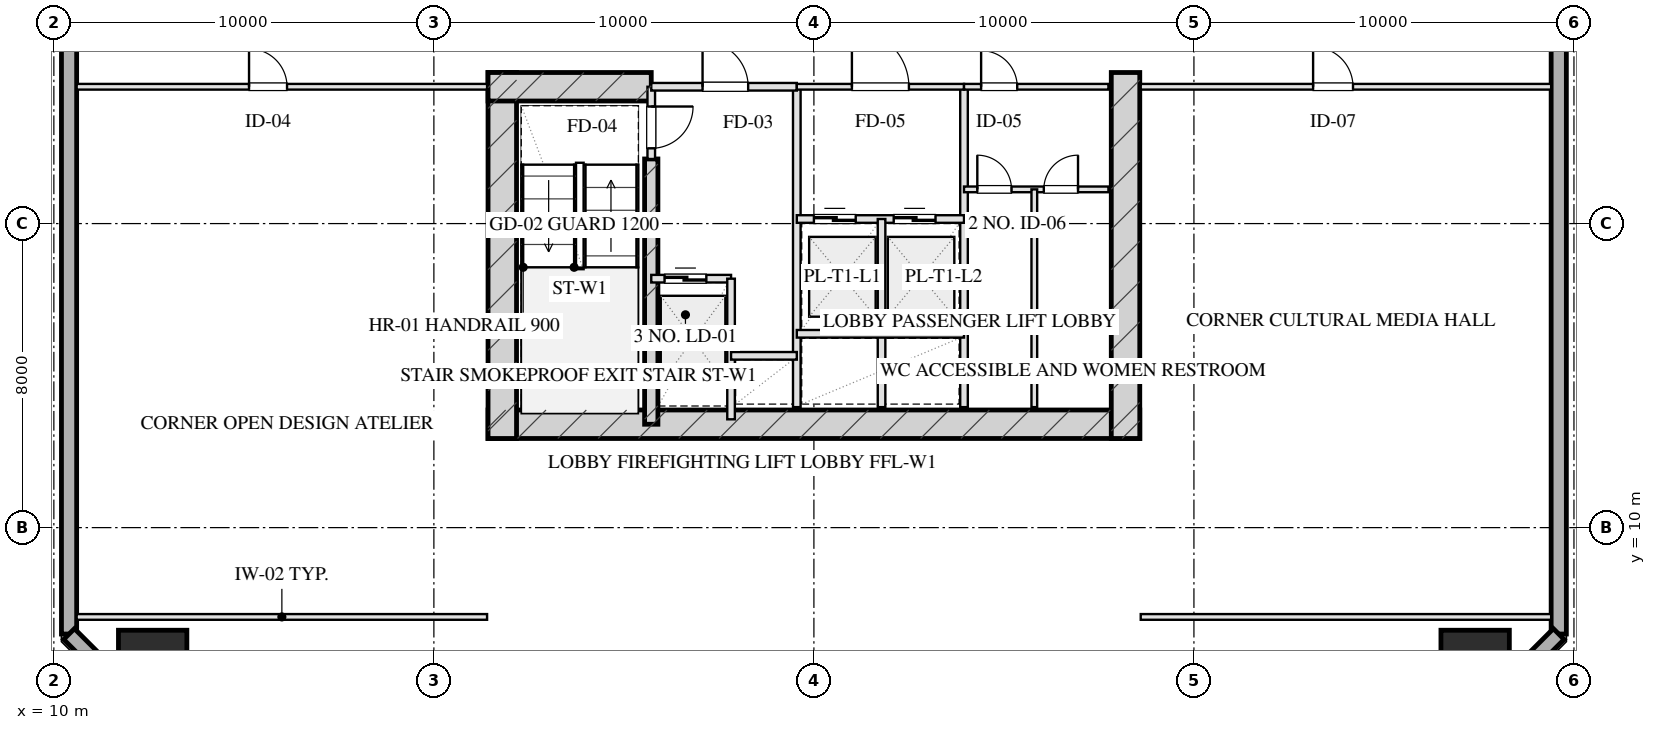
"""IFC4 building model, lengths in metres.
Left out: names, types, materials, properties, quantities, classifications, styles, units other than length and angle.
Written with IfcOpenShell. Run it as: python <this file> out.ifc"""

import sys

from ifc_helpers import new_model, si_unit, direction, frame, frame_2d, origin, origin_2d, place, context, subcontext, project, spatial, rectangle, hollow_rectangle, extrude, element, fill, save


model = new_model("IFC4")
c1 = context("Model", 3, precision=1e-05, world=origin(), true_north=direction((0.0, 1.0)))
c2 = subcontext(c1, "Body", "Model", "MODEL_VIEW")
j1 = project(units=[si_unit("LENGTHUNIT", "METRE"), si_unit("PLANEANGLEUNIT", "RADIAN")], contexts=[c1])
p1 = place(None, origin())
s1 = spatial("IfcSite", under=j1, at=p1, CompositionType="ELEMENT")
p2 = place(p1, origin())
s2 = spatial("IfcBuilding", under=s1, at=p2, CompositionType="ELEMENT")
p3 = place(p2, frame((0.0, 0.0, 81.65)))
s3 = spatial("IfcBuildingStorey", under=s2, at=p3, CompositionType="ELEMENT", Elevation=81.65)
p4 = place(p3, frame((21.425, 12.72, 0.0), z_axis=(0.0, 0.0, 1.0), x_axis=(1.0, 0.0, 0.0)))
e1 = element("IfcWall", 1, at=p4, inside=s3, PredefinedType="SHEAR", context=c2, shape_type="SweptSolid", body=[
    extrude(rectangle(XDim=17.15, YDim=0.75, at=frame_2d((8.575, 0.0))), origin(), (0.0, 0.0, 1.0), 3.45),
])
for number, where, z_axis, x_axis in (
    (2, (21.8, 21.975, 0.0), (0.0, 0.0, 1.0), (0.0, -1.0, 0.0)),
    (3, (38.2, 21.975, 0.0), (0.0, 0.0, 1.0), (0.0, -1.0, 0.0)),
):
    element("IfcWall", number, at=place(p3, frame(where, z_axis=z_axis, x_axis=x_axis)), inside=s3, PredefinedType="SHEAR", context=c2, shape_type="SweptSolid", body=[
        extrude(rectangle(XDim=9.63, YDim=0.75, at=frame_2d((4.815, 0.0))), origin(), (0.0, 0.0, 1.0), 3.45),
    ])
p5 = place(p3, frame((25.72, 19.7, 0.0), z_axis=(0.0, 0.0, 1.0), x_axis=(0.0, -1.0, 0.0)))
e4 = element("IfcWall", 4, at=p5, inside=s3, PredefinedType="SHEAR", context=c2, shape_type="SweptSolid", body=[
    extrude(rectangle(XDim=6.98, YDim=0.35, at=frame_2d((3.49, 0.0))), origin(), (0.0, 0.0, 1.0), 3.45),
])
p6 = place(p3, frame((21.425, 21.6, 0.0), z_axis=(0.0, 0.0, 1.0), x_axis=(1.0, 0.0, 0.0)))
e5 = element("IfcWall", 5, at=p6, inside=s3, PredefinedType="SHEAR", context=c2, shape_type="SweptSolid", body=[
    extrude(rectangle(XDim=4.295, YDim=0.75, at=frame_2d((2.147, 0.0))), origin(), (0.0, 0.0, 1.0), 3.45),
])
for number, where, z_axis, x_axis in (
    (6, (12.6, 6.4, 0.0), (0.0, 0.0, 1.0), (1.0, 0.0, 0.0)),
    (7, (47.4, 6.4, 0.0), (0.0, 0.0, 1.0), (1.0, 0.0, 0.0)),
):
    element("IfcColumn", number, at=place(p3, frame(where, z_axis=z_axis, x_axis=x_axis)), inside=s3, PredefinedType="COLUMN", context=c2, shape_type="SweptSolid", body=[
        extrude(hollow_rectangle(XDim=1.8, YDim=1.8, WallThickness=0.06, at=origin_2d()), origin(), (0.0, 0.0, 1.0), 3.451),
    ])
p7 = place(p3, frame((10.4, 7.2, 0.0), z_axis=(0.0, 0.0, 1.0), x_axis=(0.0, 1.0, 0.0)))
e8 = element("IfcWall", 8, at=p7, inside=s3, PredefinedType="SOLIDWALL", context=c2, shape_type="SweptSolid", body=[
    extrude(rectangle(XDim=53.6, YDim=0.4, at=frame_2d((26.8, 0.0))), origin(), (0.0, 0.0, 1.0), 2.61),
])
p8 = place(p7, frame((28.2, 0.0, 0.75)))
e9 = element("IfcOpeningElement", 9, at=p8, cuts=e8, PredefinedType="OPENING", context=c2, shape_type="SweptSolid", body=[
    extrude(rectangle(XDim=2.4, YDim=1.46, at=frame_2d((1.2, 0.73))), frame((0.0, 0.21, 0.0), z_axis=(0.0, -1.0, 0.0), x_axis=(1.0, 0.0, 0.0)), (0.0, 0.0, 1.0), 0.42),
])
p9 = place(p7, frame((32.0, 0.0, 0.75)))
e10 = element("IfcOpeningElement", 10, at=p9, cuts=e8, PredefinedType="OPENING", context=c2, shape_type="SweptSolid", body=[
    extrude(rectangle(XDim=2.4, YDim=1.46, at=frame_2d((1.2, 0.73))), frame((0.0, 0.21, 0.0), z_axis=(0.0, -1.0, 0.0), x_axis=(1.0, 0.0, 0.0)), (0.0, 0.0, 1.0), 0.42),
])
p10 = place(p7, frame((21.85, 0.0, 0.0)))
e11 = element("IfcOpeningElement", 11, at=p10, cuts=e8, PredefinedType="OPENING", context=c2, shape_type="SweptSolid", body=[
    extrude(rectangle(XDim=1.1, YDim=2.15, at=frame_2d((0.55, 1.075))), frame((0.0, 0.21, 0.0), z_axis=(0.0, -1.0, 0.0), x_axis=(1.0, 0.0, 0.0)), (0.0, 0.0, 1.0), 0.42),
])
p11 = place(p3, frame((49.6, 60.8, 0.0), z_axis=(0.0, 0.0, 1.0), x_axis=(0.0, -1.0, 0.0)))
e12 = element("IfcWall", 12, at=p11, inside=s3, PredefinedType="SOLIDWALL", context=c2, shape_type="SweptSolid", body=[
    extrude(rectangle(XDim=53.6, YDim=0.4, at=frame_2d((26.8, 0.0))), origin(), (0.0, 0.0, 1.0), 2.61),
])
p12 = place(p11, frame((32.05, 0.0, 0.0)))
e13 = element("IfcOpeningElement", 13, at=p12, cuts=e12, PredefinedType="OPENING", context=c2, shape_type="SweptSolid", body=[
    extrude(rectangle(XDim=1.1, YDim=2.15, at=frame_2d((0.55, 1.075))), frame((0.0, 0.21, 0.0), z_axis=(0.0, -1.0, 0.0), x_axis=(1.0, 0.0, 0.0)), (0.0, 0.0, 1.0), 0.42),
])
for number, where, z_axis, x_axis in (
    (14, (49.6, 7.2, 0.0), (0.0, 0.0, 1.0), (-0.707, -0.707, 0.0)),
    (15, (13.4, 4.2, 0.0), (0.0, 0.0, 1.0), (-0.707, 0.707, 0.0)),
):
    element("IfcWall", number, at=place(p3, frame(where, z_axis=z_axis, x_axis=x_axis)), inside=s3, PredefinedType="SOLIDWALL", context=c2, shape_type="SweptSolid", body=[
        extrude(rectangle(XDim=4.243, YDim=0.4, at=frame_2d((2.121, 0.0))), origin(), (0.0, 0.0, 1.0), 2.61),
    ])
p13 = place(p3, frame((25.72, 21.6, 0.0), z_axis=(0.0, 0.0, 1.0), x_axis=(0.0, -1.0, 0.0)))
e16 = element("IfcWall", 16, at=p13, inside=s3, PredefinedType="PARTITIONING", context=c2, shape_type="SweptSolid", body=[
    extrude(rectangle(XDim=1.9, YDim=0.2, at=frame_2d((0.95, 0.0))), origin(), (0.0, 0.0, 1.0), 3.175),
])
p14 = place(p13, frame((0.52, 0.0, 0.0)))
e17 = element("IfcOpeningElement", 17, at=p14, cuts=e16, PredefinedType="OPENING", context=c2, shape_type="SweptSolid", body=[
    extrude(rectangle(XDim=1.1, YDim=2.05, at=frame_2d((0.55, 1.025))), frame((0.0, 0.11, 0.0), z_axis=(0.0, -1.0, 0.0), x_axis=(1.0, 0.0, 0.0)), (0.0, 0.0, 1.0), 0.22),
])
p15 = place(p3, frame((29.55, 21.6, 0.0), z_axis=(0.0, 0.0, 1.0), x_axis=(0.0, -1.0, 0.0)))
e18 = element("IfcWall", 18, at=p15, inside=s3, PredefinedType="PARTITIONING", context=c2, shape_type="SweptSolid", body=[
    extrude(rectangle(XDim=8.43, YDim=0.2, at=frame_2d((4.215, 0.0))), origin(), (0.0, 0.0, 1.0), 3.175),
])
p16 = place(p3, frame((25.72, 21.6, 0.0), z_axis=(0.0, 0.0, 1.0), x_axis=(1.0, 0.0, 0.0)))
e19 = element("IfcWall", 19, at=p16, inside=s3, PredefinedType="PARTITIONING", context=c2, shape_type="SweptSolid", body=[
    extrude(rectangle(XDim=3.83, YDim=0.2, at=frame_2d((1.915, 0.0))), origin(), (0.0, 0.0, 1.0), 3.175),
])
p17 = place(p16, frame((1.35, 0.0, 0.0)))
e20 = element("IfcOpeningElement", 20, at=p17, cuts=e19, PredefinedType="OPENING", context=c2, shape_type="SweptSolid", body=[
    extrude(rectangle(XDim=1.2, YDim=2.05, at=frame_2d((0.6, 1.025))), frame((0.0, 0.11, 0.0), z_axis=(0.0, -1.0, 0.0), x_axis=(1.0, 0.0, 0.0)), (0.0, 0.0, 1.0), 0.22),
])
p18 = place(p3, frame((25.72, 16.55, 0.0), z_axis=(0.0, 0.0, 1.0), x_axis=(1.0, 0.0, 0.0)))
e21 = element("IfcWall", 21, at=p18, inside=s3, PredefinedType="PARTITIONING", context=c2, shape_type="SweptSolid", body=[
    extrude(rectangle(XDim=2.1, YDim=0.2, at=frame_2d((1.05, 0.0))), origin(), (0.0, 0.0, 1.0), 3.175),
])
p19 = place(p18, frame((0.35, 0.0, 0.0)))
e22 = element("IfcOpeningElement", 22, at=p19, cuts=e21, PredefinedType="OPENING", context=c2, shape_type="SweptSolid", body=[
    extrude(rectangle(XDim=1.1, YDim=2.05, at=frame_2d((0.55, 1.025))), frame((0.0, 0.11, 0.0), z_axis=(0.0, -1.0, 0.0), x_axis=(1.0, 0.0, 0.0)), (0.0, 0.0, 1.0), 0.22),
])
p20 = place(p3, frame((27.82, 16.55, 0.0), z_axis=(0.0, 0.0, 1.0), x_axis=(0.0, -1.0, 0.0)))
e23 = element("IfcWall", 23, at=p20, inside=s3, PredefinedType="PARTITIONING", context=c2, shape_type="SweptSolid", body=[
    extrude(rectangle(XDim=3.7, YDim=0.2, at=frame_2d((1.85, 0.0))), origin(), (0.0, 0.0, 1.0), 3.175),
])
p21 = place(p3, frame((27.82, 14.52, 0.0), z_axis=(0.0, 0.0, 1.0), x_axis=(1.0, 0.0, 0.0)))
e24 = element("IfcWall", 24, at=p21, inside=s3, PredefinedType="PARTITIONING", context=c2, shape_type="SweptSolid", body=[
    extrude(rectangle(XDim=1.73, YDim=0.2, at=frame_2d((0.865, 0.0))), origin(), (0.0, 0.0, 1.0), 3.175),
])
p22 = place(p3, frame((33.95, 21.6, 0.0), z_axis=(0.0, 0.0, 1.0), x_axis=(0.0, -1.0, 0.0)))
e25 = element("IfcWall", 25, at=p22, inside=s3, PredefinedType="PARTITIONING", context=c2, shape_type="SweptSolid", body=[
    extrude(rectangle(XDim=8.43, YDim=0.2, at=frame_2d((4.215, 0.0))), origin(), (0.0, 0.0, 1.0), 3.175),
])
p23 = place(p3, frame((29.55, 21.6, 0.0), z_axis=(0.0, 0.0, 1.0), x_axis=(1.0, 0.0, 0.0)))
e26 = element("IfcWall", 26, at=p23, inside=s3, PredefinedType="PARTITIONING", context=c2, shape_type="SweptSolid", body=[
    extrude(rectangle(XDim=4.4, YDim=0.15, at=frame_2d((2.2, 0.0))), origin(), (0.0, 0.0, 1.0), 3.175),
])
p24 = place(p23, frame((1.45, 0.0, 0.0)))
e27 = element("IfcOpeningElement", 27, at=p24, cuts=e26, PredefinedType="OPENING", context=c2, shape_type="SweptSolid", body=[
    extrude(rectangle(XDim=1.5, YDim=2.05, at=frame_2d((0.75, 1.025))), frame((0.0, 0.085, 0.0), z_axis=(0.0, -1.0, 0.0), x_axis=(1.0, 0.0, 0.0)), (0.0, 0.0, 1.0), 0.17),
])
p25 = place(p3, frame((29.55, 18.12, 0.0), z_axis=(0.0, 0.0, 1.0), x_axis=(1.0, 0.0, 0.0)))
e28 = element("IfcWall", 28, at=p25, inside=s3, PredefinedType="PARTITIONING", context=c2, shape_type="SweptSolid", body=[
    extrude(rectangle(XDim=4.4, YDim=0.2, at=frame_2d((2.2, 0.0))), origin(), (0.0, 0.0, 1.0), 3.175),
])
p26 = place(p25, frame((0.45, 0.0, 0.0)))
e29 = element("IfcOpeningElement", 29, at=p26, cuts=e28, PredefinedType="OPENING", context=c2, shape_type="SweptSolid", body=[
    extrude(rectangle(XDim=1.1, YDim=2.05, at=frame_2d((0.55, 1.025))), frame((0.0, 0.11, 0.0), z_axis=(0.0, -1.0, 0.0), x_axis=(1.0, 0.0, 0.0)), (0.0, 0.0, 1.0), 0.22),
])
p27 = place(p25, frame((2.55, 0.0, 0.0)))
e30 = element("IfcOpeningElement", 30, at=p27, cuts=e28, PredefinedType="OPENING", context=c2, shape_type="SweptSolid", body=[
    extrude(rectangle(XDim=1.1, YDim=2.05, at=frame_2d((0.55, 1.025))), frame((0.0, 0.11, 0.0), z_axis=(0.0, -1.0, 0.0), x_axis=(1.0, 0.0, 0.0)), (0.0, 0.0, 1.0), 0.22),
])
p28 = place(p3, frame((31.78, 18.12, 0.0), z_axis=(0.0, 0.0, 1.0), x_axis=(0.0, -1.0, 0.0)))
e31 = element("IfcWall", 31, at=p28, inside=s3, PredefinedType="PARTITIONING", context=c2, shape_type="SweptSolid", body=[
    extrude(rectangle(XDim=4.95, YDim=0.2, at=frame_2d((2.475, 0.0))), origin(), (0.0, 0.0, 1.0), 3.175),
])
p29 = place(p3, frame((29.55, 15.1, 0.0), z_axis=(0.0, 0.0, 1.0), x_axis=(1.0, 0.0, 0.0)))
e32 = element("IfcWall", 32, at=p29, inside=s3, PredefinedType="PARTITIONING", context=c2, shape_type="SweptSolid", body=[
    extrude(rectangle(XDim=4.4, YDim=0.2, at=frame_2d((2.2, 0.0))), origin(), (0.0, 0.0, 1.0), 3.175),
])
p30 = place(p3, frame((33.95, 21.6, 0.0), z_axis=(0.0, 0.0, 1.0), x_axis=(1.0, 0.0, 0.0)))
e33 = element("IfcWall", 33, at=p30, inside=s3, PredefinedType="PARTITIONING", context=c2, shape_type="SweptSolid", body=[
    extrude(rectangle(XDim=3.8, YDim=0.15, at=frame_2d((1.9, 0.0))), origin(), (0.0, 0.0, 1.0), 3.175),
])
p31 = place(p30, frame((0.45, 0.0, 0.0)))
e34 = element("IfcOpeningElement", 34, at=p31, cuts=e33, PredefinedType="OPENING", context=c2, shape_type="SweptSolid", body=[
    extrude(rectangle(XDim=0.95, YDim=2.05, at=frame_2d((0.475, 1.025))), frame((0.0, 0.085, 0.0), z_axis=(0.0, -1.0, 0.0), x_axis=(1.0, 0.0, 0.0)), (0.0, 0.0, 1.0), 0.17),
])
p32 = place(p3, frame((33.95, 18.9, 0.0), z_axis=(0.0, 0.0, 1.0), x_axis=(1.0, 0.0, 0.0)))
e35 = element("IfcWall", 35, at=p32, inside=s3, PredefinedType="PARTITIONING", context=c2, shape_type="SweptSolid", body=[
    extrude(rectangle(XDim=3.8, YDim=0.15, at=frame_2d((1.9, 0.0))), origin(), (0.0, 0.0, 1.0), 3.175),
])
p33 = place(p32, frame((0.35, 0.0, 0.0)))
e36 = element("IfcOpeningElement", 36, at=p33, cuts=e35, PredefinedType="OPENING", context=c2, shape_type="SweptSolid", body=[
    extrude(rectangle(XDim=0.9, YDim=2.05, at=frame_2d((0.45, 1.025))), frame((0.0, 0.085, 0.0), z_axis=(0.0, -1.0, 0.0), x_axis=(1.0, 0.0, 0.0)), (0.0, 0.0, 1.0), 0.17),
])
p34 = place(p32, frame((2.1, 0.0, 0.0)))
e37 = element("IfcOpeningElement", 37, at=p34, cuts=e35, PredefinedType="OPENING", context=c2, shape_type="SweptSolid", body=[
    extrude(rectangle(XDim=0.9, YDim=2.05, at=frame_2d((0.45, 1.025))), frame((0.0, 0.085, 0.0), z_axis=(0.0, -1.0, 0.0), x_axis=(1.0, 0.0, 0.0)), (0.0, 0.0, 1.0), 0.17),
])
p35 = place(p3, frame((35.8, 18.9, 0.0), z_axis=(0.0, 0.0, 1.0), x_axis=(0.0, -1.0, 0.0)))
e38 = element("IfcWall", 38, at=p35, inside=s3, PredefinedType="PARTITIONING", context=c2, shape_type="SweptSolid", body=[
    extrude(rectangle(XDim=5.73, YDim=0.15, at=frame_2d((2.865, 0.0))), origin(), (0.0, 0.0, 1.0), 3.175),
])
p36 = place(p3, frame((10.6, 7.65, 0.0), z_axis=(0.0, 0.0, 1.0), x_axis=(1.0, 0.0, 0.0)))
e39 = element("IfcWall", 39, at=p36, inside=s3, PredefinedType="PARTITIONING", context=c2, shape_type="SweptSolid", body=[
    extrude(rectangle(XDim=10.8, YDim=0.15, at=frame_2d((5.4, 0.0))), origin(), (0.0, 0.0, 1.0), 3.175),
])
p37 = place(p3, frame((10.6, 21.6, 0.0), z_axis=(0.0, 0.0, 1.0), x_axis=(1.0, 0.0, 0.0)))
e40 = element("IfcWall", 40, at=p37, inside=s3, PredefinedType="PARTITIONING", context=c2, shape_type="SweptSolid", body=[
    extrude(rectangle(XDim=10.8, YDim=0.15, at=frame_2d((5.4, 0.0))), origin(), (0.0, 0.0, 1.0), 3.175),
])
p38 = place(p37, frame((4.536, 0.0, 0.0)))
e41 = element("IfcOpeningElement", 41, at=p38, cuts=e40, PredefinedType="OPENING", context=c2, shape_type="SweptSolid", body=[
    extrude(rectangle(XDim=1.0, YDim=2.05, at=frame_2d((0.5, 1.025))), frame((0.0, 0.085, 0.0), z_axis=(0.0, -1.0, 0.0), x_axis=(1.0, 0.0, 0.0)), (0.0, 0.0, 1.0), 0.17),
])
p39 = place(p3, frame((38.6, 7.65, 0.0), z_axis=(0.0, 0.0, 1.0), x_axis=(1.0, 0.0, 0.0)))
e42 = element("IfcWall", 42, at=p39, inside=s3, PredefinedType="PARTITIONING", context=c2, shape_type="SweptSolid", body=[
    extrude(rectangle(XDim=10.8, YDim=0.15, at=frame_2d((5.4, 0.0))), origin(), (0.0, 0.0, 1.0), 3.175),
])
p40 = place(p3, frame((38.6, 21.6, 0.0), z_axis=(0.0, 0.0, 1.0), x_axis=(1.0, 0.0, 0.0)))
e43 = element("IfcWall", 43, at=p40, inside=s3, PredefinedType="PARTITIONING", context=c2, shape_type="SweptSolid", body=[
    extrude(rectangle(XDim=10.8, YDim=0.15, at=frame_2d((5.4, 0.0))), origin(), (0.0, 0.0, 1.0), 3.175),
])
p41 = place(p40, frame((4.536, 0.0, 0.0)))
e44 = element("IfcOpeningElement", 44, at=p41, cuts=e43, PredefinedType="OPENING", context=c2, shape_type="SweptSolid", body=[
    extrude(rectangle(XDim=1.05, YDim=2.05, at=frame_2d((0.525, 1.025))), frame((0.0, 0.085, 0.0), z_axis=(0.0, -1.0, 0.0), x_axis=(1.0, 0.0, 0.0)), (0.0, 0.0, 1.0), 0.17),
])
p42 = place(p14, origin())
e45 = element("IfcDoor", 45, at=p42, inside=s3, OperationType="SINGLE_SWING_LEFT", PredefinedType="DOOR", context=c2, shape_type="SweptSolid", body=[
    extrude(rectangle(XDim=1.1, YDim=2.05, at=frame_2d((0.55, 1.025))), frame((0.0, 0.025, 0.0), z_axis=(0.0, -1.0, 0.0), x_axis=(1.0, 0.0, 0.0)), (0.0, 0.0, 1.0), 0.05),
])
fill(e17, e45)
p43 = place(p17, origin())
e46 = element("IfcDoor", 46, at=p43, inside=s3, OperationType="SINGLE_SWING_LEFT", PredefinedType="DOOR", context=c2, shape_type="SweptSolid", body=[
    extrude(rectangle(XDim=1.2, YDim=2.05, at=frame_2d((0.6, 1.025))), frame((0.0, 0.025, 0.0), z_axis=(0.0, -1.0, 0.0), x_axis=(1.0, 0.0, 0.0)), (0.0, 0.0, 1.0), 0.05),
])
fill(e20, e46)
p44 = place(p19, origin())
e47 = element("IfcDoor", 47, at=p44, inside=s3, OperationType="DOUBLE_DOOR_SLIDING", PredefinedType="DOOR", context=c2, shape_type="SweptSolid", body=[
    extrude(rectangle(XDim=1.1, YDim=2.05, at=frame_2d((0.55, 1.025))), frame((0.0, 0.025, 0.0), z_axis=(0.0, -1.0, 0.0), x_axis=(1.0, 0.0, 0.0)), (0.0, 0.0, 1.0), 0.05),
])
fill(e22, e47)
p45 = place(p24, origin())
e48 = element("IfcDoor", 48, at=p45, inside=s3, OperationType="SINGLE_SWING_LEFT", PredefinedType="DOOR", context=c2, shape_type="SweptSolid", body=[
    extrude(rectangle(XDim=1.5, YDim=2.05, at=frame_2d((0.75, 1.025))), frame((0.0, 0.025, 0.0), z_axis=(0.0, -1.0, 0.0), x_axis=(1.0, 0.0, 0.0)), (0.0, 0.0, 1.0), 0.05),
])
fill(e27, e48)
p46 = place(p26, origin())
e49 = element("IfcDoor", 49, at=p46, inside=s3, OperationType="DOUBLE_DOOR_SLIDING", PredefinedType="DOOR", context=c2, shape_type="SweptSolid", body=[
    extrude(rectangle(XDim=1.1, YDim=2.05, at=frame_2d((0.55, 1.025))), frame((0.0, 0.025, 0.0), z_axis=(0.0, -1.0, 0.0), x_axis=(1.0, 0.0, 0.0)), (0.0, 0.0, 1.0), 0.05),
])
fill(e29, e49)
p47 = place(p27, origin())
e50 = element("IfcDoor", 50, at=p47, inside=s3, OperationType="DOUBLE_DOOR_SLIDING", PredefinedType="DOOR", context=c2, shape_type="SweptSolid", body=[
    extrude(rectangle(XDim=1.1, YDim=2.05, at=frame_2d((0.55, 1.025))), frame((0.0, 0.025, 0.0), z_axis=(0.0, -1.0, 0.0), x_axis=(1.0, 0.0, 0.0)), (0.0, 0.0, 1.0), 0.05),
])
fill(e30, e50)
p48 = place(p31, origin())
e51 = element("IfcDoor", 51, at=p48, inside=s3, OperationType="SINGLE_SWING_LEFT", PredefinedType="DOOR", context=c2, shape_type="SweptSolid", body=[
    extrude(rectangle(XDim=0.95, YDim=2.05, at=frame_2d((0.475, 1.025))), frame((0.0, 0.025, 0.0), z_axis=(0.0, -1.0, 0.0), x_axis=(1.0, 0.0, 0.0)), (0.0, 0.0, 1.0), 0.05),
])
fill(e34, e51)
p49 = place(p33, origin())
e52 = element("IfcDoor", 52, at=p49, inside=s3, OperationType="SINGLE_SWING_LEFT", PredefinedType="DOOR", context=c2, shape_type="SweptSolid", body=[
    extrude(rectangle(XDim=0.9, YDim=2.05, at=frame_2d((0.45, 1.025))), frame((0.0, 0.025, 0.0), z_axis=(0.0, -1.0, 0.0), x_axis=(1.0, 0.0, 0.0)), (0.0, 0.0, 1.0), 0.05),
])
fill(e36, e52)
p50 = place(p34, origin())
e53 = element("IfcDoor", 53, at=p50, inside=s3, OperationType="SINGLE_SWING_RIGHT", PredefinedType="DOOR", context=c2, shape_type="SweptSolid", body=[
    extrude(rectangle(XDim=0.9, YDim=2.05, at=frame_2d((0.45, 1.025))), frame((0.0, 0.025, 0.0), z_axis=(0.0, -1.0, 0.0), x_axis=(1.0, 0.0, 0.0)), (0.0, 0.0, 1.0), 0.05),
])
fill(e37, e53)
p51 = place(p38, origin())
e54 = element("IfcDoor", 54, at=p51, inside=s3, OperationType="SINGLE_SWING_LEFT", PredefinedType="DOOR", context=c2, shape_type="SweptSolid", body=[
    extrude(rectangle(XDim=1.0, YDim=2.05, at=frame_2d((0.5, 1.025))), frame((0.0, 0.025, 0.0), z_axis=(0.0, -1.0, 0.0), x_axis=(1.0, 0.0, 0.0)), (0.0, 0.0, 1.0), 0.05),
])
fill(e41, e54)
p52 = place(p41, origin())
e55 = element("IfcDoor", 55, at=p52, inside=s3, OperationType="SINGLE_SWING_LEFT", PredefinedType="DOOR", context=c2, shape_type="SweptSolid", body=[
    extrude(rectangle(XDim=1.05, YDim=2.05, at=frame_2d((0.525, 1.025))), frame((0.0, 0.025, 0.0), z_axis=(0.0, -1.0, 0.0), x_axis=(1.0, 0.0, 0.0)), (0.0, 0.0, 1.0), 0.05),
])
fill(e44, e55)
save(model, sys.argv[1])
